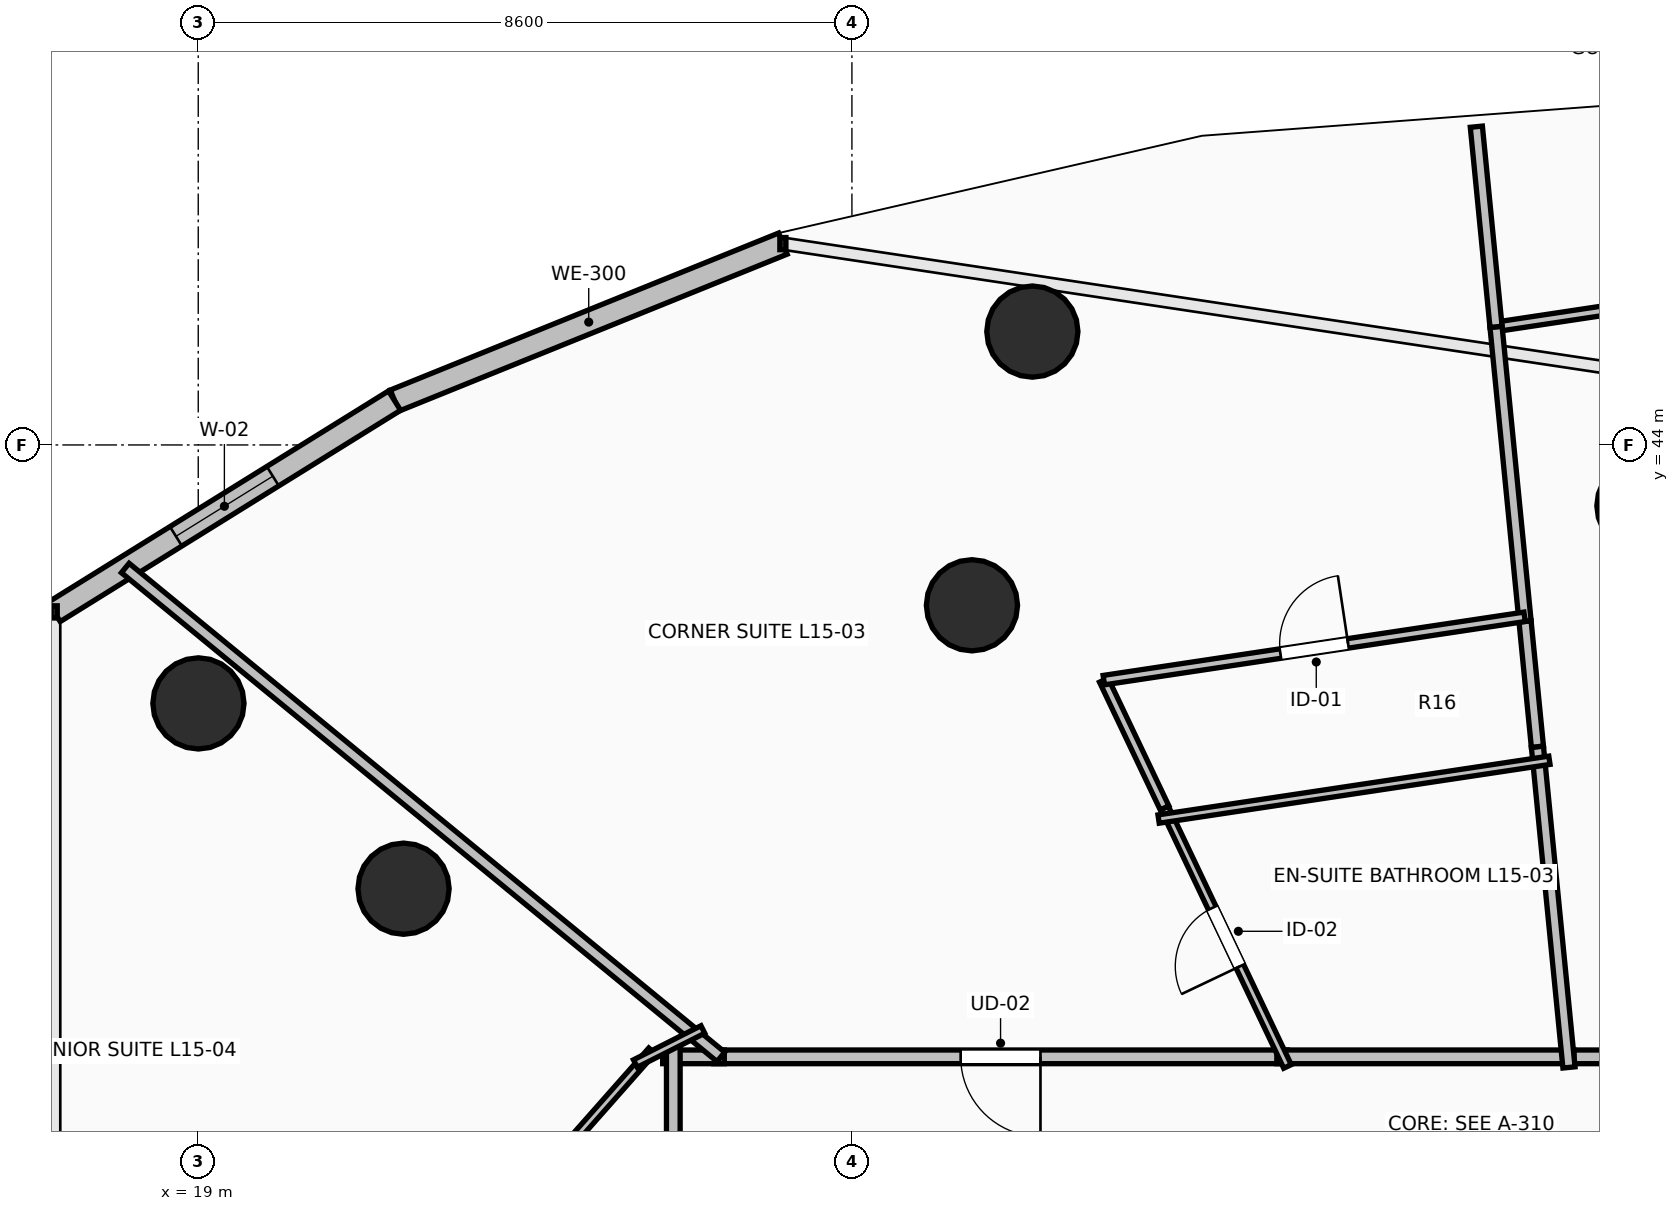
"""IFC4 building model, lengths in metres.
Left out: names, types, materials, properties, quantities, classifications, styles, units other than length and angle.
Written with IfcOpenShell. Run it as: python <this file> out.ifc"""

import sys

from ifc_helpers import new_model, si_unit, direction, frame, frame_2d, origin, origin_2d, place, context, subcontext, project, spatial, rectangle, circle, extrude, element, fill, save


model = new_model("IFC4")
c1 = context("Model", 3, precision=1e-05, world=origin(), true_north=direction((0.0, 1.0)))
c2 = subcontext(c1, "Body", "Model", "MODEL_VIEW")
j1 = project(units=[si_unit("LENGTHUNIT", "METRE"), si_unit("PLANEANGLEUNIT", "RADIAN")], contexts=[c1])
p1 = place(None, origin())
s1 = spatial("IfcSite", under=j1, at=p1, CompositionType="ELEMENT")
p2 = place(p1, origin())
s2 = spatial("IfcBuilding", under=s1, at=p2, CompositionType="ELEMENT")
p3 = place(p2, frame((0.0, 0.0, 59.0)))
s3 = spatial("IfcBuildingStorey", under=s2, at=p3, CompositionType="ELEMENT", Elevation=59.0)
for number, where, z_axis, x_axis in (
    (1, (38.0, 43.2, 0.0), (0.0, 0.0, 1.0), (0.0, 1.0, 0.0)),
    (2, (29.179, 41.891, 0.0), (0.0, 0.0, 1.0), (-0.383, 0.924, 0.0)),
    (3, (21.701, 38.162, 0.0), (0.0, 0.0, 1.0), (-0.707, 0.707, 0.0)),
    (4, (29.974, 45.492, 0.0), (0.0, 0.0, 1.0), (-0.383, 0.924, 0.0)),
    (5, (19.003, 40.6, 0.0), (0.0, 0.0, 1.0), (-0.707, 0.707, 0.0)),
):
    element("IfcColumn", number, at=place(p3, frame(where, z_axis=z_axis, x_axis=x_axis)), inside=s3, PredefinedType="COLUMN", context=c2, shape_type="SweptSolid", body=[
        extrude(circle(Radius=0.6, at=origin_2d()), origin(), (0.0, 0.0, 1.0), 3.5),
    ])
p4 = place(p3, frame((26.692, 46.649, 0.0), z_axis=(0.0, 0.0, 1.0), x_axis=(-0.927095325176, -0.374825636845, 0.0)))
e6 = element("IfcWall", 6, at=p4, inside=s3, PredefinedType="STANDARD", context=c2, shape_type="SweptSolid", body=[
    extrude(rectangle(XDim=5.51, YDim=0.3, at=frame_2d((2.755, 0.0))), origin(), (0.0, 0.0, 1.0), 3.24),
])
p5 = place(p3, frame((21.583, 44.583, 0.0), z_axis=(0.0, 0.0, 1.0), x_axis=(-0.849633724826, -0.527373239404, 0.0)))
e7 = element("IfcWall", 7, at=p5, inside=s3, PredefinedType="STANDARD", context=c2, shape_type="SweptSolid", body=[
    extrude(rectangle(XDim=5.271, YDim=0.3, at=frame_2d((2.635, 0.0))), origin(), (0.0, 0.0, 1.0), 3.24),
])
p6 = place(p5, frame((1.885, 0.0, 0.85)))
e8 = element("IfcOpeningElement", 8, at=p6, cuts=e7, PredefinedType="OPENING", context=c2, shape_type="SweptSolid", body=[
    extrude(rectangle(XDim=1.5, YDim=2.19, at=frame_2d((0.75, 1.095))), frame((0.0, 0.165, 0.0), z_axis=(0.0, -1.0, 0.0), x_axis=(1.0, 0.0, 0.0)), (0.0, 0.0, 1.0), 0.33),
])
p7 = place(p3, frame((41.602, 35.95, 0.0), z_axis=(0.0, 0.0, 1.0), x_axis=(-1.0, 0.0, 0.0)))
e9 = element("IfcWall", 9, at=p7, inside=s3, PredefinedType="PARTITIONING", context=c2, shape_type="SweptSolid", body=[
    extrude(rectangle(XDim=4.642, YDim=0.18, at=frame_2d((2.321, 0.0))), origin(), (0.0, 0.0, 1.0), 3.24),
])
p8 = place(p7, frame((1.796, 0.0, 0.0)))
e10 = element("IfcOpeningElement", 10, at=p8, cuts=e9, PredefinedType="OPENING", context=c2, shape_type="SweptSolid", body=[
    extrude(rectangle(XDim=1.05, YDim=2.2, at=frame_2d((0.525, 1.1))), frame((0.0, 0.105, 0.0), z_axis=(0.0, -1.0, 0.0), x_axis=(1.0, 0.0, 0.0)), (0.0, 0.0, 1.0), 0.21),
])
p9 = place(p3, frame((33.33, 35.95, 0.0), z_axis=(0.0, 0.0, 1.0), x_axis=(-1.0, 0.0, 0.0)))
e11 = element("IfcWall", 11, at=p9, inside=s3, PredefinedType="PARTITIONING", context=c2, shape_type="SweptSolid", body=[
    extrude(rectangle(XDim=7.549, YDim=0.18, at=frame_2d((3.774, 0.0))), origin(), (0.0, 0.0, 1.0), 2.432),
])
p10 = place(p9, frame((3.25, 0.0, 0.0)))
e12 = element("IfcOpeningElement", 12, at=p10, cuts=e11, PredefinedType="OPENING", context=c2, shape_type="SweptSolid", body=[
    extrude(rectangle(XDim=1.05, YDim=2.2, at=frame_2d((0.525, 1.1))), frame((0.0, 0.105, 0.0), z_axis=(0.0, -1.0, 0.0), x_axis=(1.0, 0.0, 0.0)), (0.0, 0.0, 1.0), 0.21),
])
p11 = place(p3, frame((37.1, 35.95, 0.0), z_axis=(0.0, 0.0, 1.0), x_axis=(-1.0, 0.0, 0.0)))
e13 = element("IfcWall", 13, at=p11, inside=s3, PredefinedType="PARTITIONING", context=c2, shape_type="SweptSolid", body=[
    extrude(rectangle(XDim=3.91, YDim=0.18, at=frame_2d((1.955, 0.0))), origin(), (0.0, 0.0, 1.0), 3.24),
])
p12 = place(p3, frame((25.921, 35.95, 0.0), z_axis=(0.0, 0.0, 1.0), x_axis=(-1.0, 0.0, 0.0)))
e14 = element("IfcWall", 14, at=p12, inside=s3, PredefinedType="PARTITIONING", context=c2, shape_type="SweptSolid", body=[
    extrude(rectangle(XDim=0.811, YDim=0.18, at=frame_2d((0.405, 0.0))), origin(), (0.0, 0.0, 1.0), 2.929),
])
p13 = place(p3, frame((25.25, 36.09, 0.0), z_axis=(0.0, 0.0, 1.0), x_axis=(0.0, -1.0, 0.0)))
e15 = element("IfcWall", 15, at=p13, inside=s3, PredefinedType="PARTITIONING", context=c2, shape_type="SweptSolid", body=[
    extrude(rectangle(XDim=5.632, YDim=0.18, at=frame_2d((2.816, 0.0))), origin(), (0.0, 0.0, 1.0), 2.432),
])
p14 = place(p3, frame((38.0, 45.844, 0.0), z_axis=(0.0, 0.0, 1.0), x_axis=(-0.988850683948, -0.148910459188, 0.0)))
e16 = element("IfcWall", 16, at=p14, inside=s3, PredefinedType="PARTITIONING", context=c2, shape_type="SweptSolid", body=[
    extrude(rectangle(XDim=1.948, YDim=0.125, at=frame_2d((0.974, 0.0))), origin(), (0.0, 0.0, 1.0), 2.624),
])
p15 = place(p3, frame((36.074, 45.554, 0.0), z_axis=(0.0, 0.0, 1.0), x_axis=(0.098125465648, -0.995174051607, 0.0)))
e17 = element("IfcWall", 17, at=p15, inside=s3, PredefinedType="PARTITIONING", context=c2, shape_type="SweptSolid", body=[
    extrude(rectangle(XDim=3.894, YDim=0.16, at=frame_2d((1.947, 0.0))), origin(), (0.0, 0.0, 1.0), 2.432),
])
p16 = place(p3, frame((36.618, 40.03, 0.0), z_axis=(0.0, 0.0, 1.0), x_axis=(0.09794716995, -0.995191615669, 0.0)))
e18 = element("IfcWall", 18, at=p16, inside=s3, PredefinedType="PARTITIONING", context=c2, shape_type="SweptSolid", body=[
    extrude(rectangle(XDim=4.24, YDim=0.16, at=frame_2d((2.12, 0.0))), origin(), (0.0, 0.0, 1.0), 2.929),
])
p17 = place(p3, frame((36.456, 41.679, 0.0), z_axis=(0.0, 0.0, 1.0), x_axis=(0.098146679276, -0.995171959687, 0.0)))
e19 = element("IfcWall", 19, at=p17, inside=s3, PredefinedType="PARTITIONING", context=c2, shape_type="SweptSolid", body=[
    extrude(rectangle(XDim=1.657, YDim=0.16, at=frame_2d((0.828, 0.0))), origin(), (0.0, 0.0, 1.0), 2.432),
])
p18 = place(p3, frame((35.815, 48.187, 0.0), z_axis=(0.0, 0.0, 1.0), x_axis=(0.097904750383, -0.995195789708, 0.0)))
e20 = element("IfcWall", 20, at=p18, inside=s3, PredefinedType="PARTITIONING", context=c2, shape_type="SweptSolid", body=[
    extrude(rectangle(XDim=2.646, YDim=0.16, at=frame_2d((1.323, 0.0))), origin(), (0.0, 0.0, 1.0), 2.624),
])
p19 = place(p3, frame((33.33, 35.823, 0.0), z_axis=(0.0, 0.0, 1.0), x_axis=(-0.429339722165, 0.903143068938, 0.0)))
e21 = element("IfcWall", 21, at=p19, inside=s3, PredefinedType="PARTITIONING", context=c2, shape_type="SweptSolid", body=[
    extrude(rectangle(XDim=3.767, YDim=0.11, at=frame_2d((1.883, 0.0))), origin(), (0.0, 0.0, 1.0), 2.432),
])
p20 = place(p19, frame((1.458, 0.0, 0.0)))
e22 = element("IfcOpeningElement", 22, at=p20, cuts=e21, PredefinedType="OPENING", context=c2, shape_type="SweptSolid", body=[
    extrude(rectangle(XDim=0.85, YDim=2.1, at=frame_2d((0.425, 1.05))), frame((0.0, 0.07, 0.0), z_axis=(0.0, -1.0, 0.0), x_axis=(1.0, 0.0, 0.0)), (0.0, 0.0, 1.0), 0.14),
])
p21 = place(p3, frame((31.713, 39.225, 0.0), z_axis=(0.0, 0.0, 1.0), x_axis=(-0.429281598359, 0.90317069777, 0.0)))
e23 = element("IfcWall", 23, at=p21, inside=s3, PredefinedType="PARTITIONING", context=c2, shape_type="SweptSolid", body=[
    extrude(rectangle(XDim=1.861, YDim=0.125, at=frame_2d((0.93, 0.0))), origin(), (0.0, 0.0, 1.0), 2.886),
])
p22 = place(p3, frame((30.914, 40.906, 0.0), z_axis=(0.0, 0.0, 1.0), x_axis=(0.988867472121, 0.148798933401, 0.0)))
e24 = element("IfcWall", 24, at=p22, inside=s3, PredefinedType="PARTITIONING", context=c2, shape_type="SweptSolid", body=[
    extrude(rectangle(XDim=5.598, YDim=0.125, at=frame_2d((2.799, 0.0))), origin(), (0.0, 0.0, 1.0), 2.432),
])
p23 = place(p22, frame((2.349, 0.0, 0.0)))
e25 = element("IfcOpeningElement", 25, at=p23, cuts=e24, PredefinedType="OPENING", context=c2, shape_type="SweptSolid", body=[
    extrude(rectangle(XDim=0.9, YDim=2.1, at=frame_2d((0.45, 1.05))), frame((0.0, 0.077, 0.0), z_axis=(0.0, -1.0, 0.0), x_axis=(1.0, 0.0, 0.0)), (0.0, 0.0, 1.0), 0.155),
])
p24 = place(p3, frame((18.04, 42.381, 0.0), z_axis=(0.0, 0.0, 1.0), x_axis=(0.772992813725, -0.634414777515, 0.0)))
e26 = element("IfcWall", 26, at=p24, inside=s3, PredefinedType="PARTITIONING", context=c2, shape_type="SweptSolid", body=[
    extrude(rectangle(XDim=10.137, YDim=0.16, at=frame_2d((5.069, 0.0))), origin(), (0.0, 0.0, 1.0), 2.624),
])
p25 = place(p3, frame((36.776, 39.852, 0.0), z_axis=(0.0, 0.0, 1.0), x_axis=(-0.988868403521, -0.148792743496, 0.0)))
e27 = element("IfcWall", 27, at=p25, inside=s3, PredefinedType="PARTITIONING", context=c2, shape_type="SweptSolid", body=[
    extrude(rectangle(XDim=5.2, YDim=0.11, at=frame_2d((2.6, 0.0))), origin(), (0.0, 0.0, 1.0), 2.432),
])
p26 = place(p3, frame((21.248, 31.819, 0.0), z_axis=(0.0, 0.0, 1.0), x_axis=(0.662135950736, 0.749383735307, 0.0)))
e28 = element("IfcWall", 28, at=p26, inside=s3, PredefinedType="PARTITIONING", context=c2, shape_type="SweptSolid", body=[
    extrude(rectangle(XDim=5.619, YDim=0.11, at=frame_2d((2.81, 0.0))), origin(), (0.0, 0.0, 1.0), 2.432),
])
p27 = place(p26, frame((2.385, 0.0, 0.0)))
e29 = element("IfcOpeningElement", 29, at=p27, cuts=e28, PredefinedType="OPENING", context=c2, shape_type="SweptSolid", body=[
    extrude(rectangle(XDim=0.85, YDim=2.1, at=frame_2d((0.425, 1.05))), frame((0.0, 0.07, 0.0), z_axis=(0.0, -1.0, 0.0), x_axis=(1.0, 0.0, 0.0)), (0.0, 0.0, 1.0), 0.14),
])
p28 = place(p3, frame((24.751, 35.862, 0.0), z_axis=(0.0, 0.0, 1.0), x_axis=(0.892702438486, 0.450646598037, 0.0)))
e30 = element("IfcWall", 30, at=p28, inside=s3, PredefinedType="PARTITIONING", context=c2, shape_type="SweptSolid", body=[
    extrude(rectangle(XDim=0.995, YDim=0.11, at=frame_2d((0.497, 0.0))), origin(), (0.0, 0.0, 1.0), 3.24),
])
p29 = place(p6, origin())
e31 = element("IfcWindow", 31, at=p29, inside=s3, PartitioningType="SINGLE_PANEL", PredefinedType="WINDOW", context=c2, shape_type="SweptSolid", body=[
    extrude(rectangle(XDim=1.5, YDim=2.19, at=frame_2d((0.75, 1.095))), frame((0.0, 0.03, 0.0), z_axis=(0.0, -1.0, 0.0), x_axis=(1.0, 0.0, 0.0)), (0.0, 0.0, 1.0), 0.06),
])
fill(e8, e31)
p30 = place(p10, origin())
e32 = element("IfcDoor", 32, at=p30, inside=s3, OperationType="SINGLE_SWING_LEFT", PredefinedType="DOOR", context=c2, shape_type="SweptSolid", body=[
    extrude(rectangle(XDim=1.05, YDim=2.2, at=frame_2d((0.525, 1.1))), frame((0.0, 0.025, 0.0), z_axis=(0.0, -1.0, 0.0), x_axis=(1.0, 0.0, 0.0)), (0.0, 0.0, 1.0), 0.05),
])
fill(e12, e32)
p31 = place(p20, origin())
e33 = element("IfcDoor", 33, at=p31, inside=s3, OperationType="SINGLE_SWING_LEFT", PredefinedType="DOOR", context=c2, shape_type="SweptSolid", body=[
    extrude(rectangle(XDim=0.85, YDim=2.1, at=frame_2d((0.425, 1.05))), frame((0.0, 0.025, 0.0), z_axis=(0.0, -1.0, 0.0), x_axis=(1.0, 0.0, 0.0)), (0.0, 0.0, 1.0), 0.05),
])
fill(e22, e33)
p32 = place(p23, origin())
e34 = element("IfcDoor", 34, at=p32, inside=s3, OperationType="SINGLE_SWING_RIGHT", PredefinedType="DOOR", context=c2, shape_type="SweptSolid", body=[
    extrude(rectangle(XDim=0.9, YDim=2.1, at=frame_2d((0.45, 1.05))), frame((0.0, 0.025, 0.0), z_axis=(0.0, -1.0, 0.0), x_axis=(1.0, 0.0, 0.0)), (0.0, 0.0, 1.0), 0.05),
])
fill(e25, e34)
save(model, sys.argv[1])
